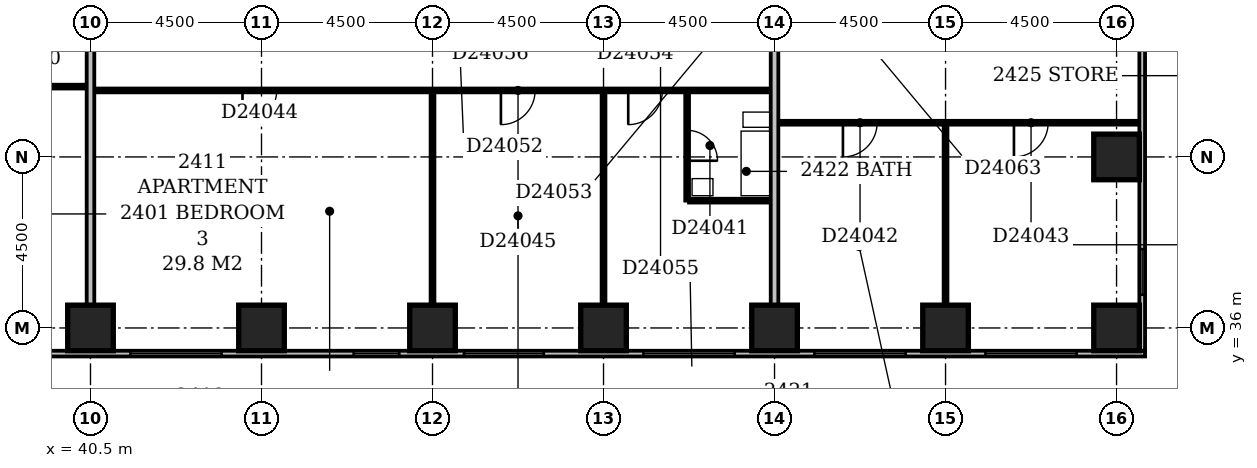
"""IFC4 building model, lengths in metres.
Left out: names, types, materials, properties, quantities, classifications, styles, units other than length and angle.
Written with IfcOpenShell. Run it as: python <this file> out.ifc"""

import sys

from ifc_helpers import new_model, si_unit, direction, frame, frame_2d, origin, origin_2d, place, context, subcontext, project, spatial, rectangle, extrude, element, fill, save


model = new_model("IFC4")
c1 = context("Model", 3, precision=1e-05, world=origin(), true_north=direction((0.0, 1.0)))
c2 = subcontext(c1, "Body", "Model", "MODEL_VIEW")
j1 = project(units=[si_unit("LENGTHUNIT", "METRE"), si_unit("PLANEANGLEUNIT", "RADIAN")], contexts=[c1])
p1 = place(None, origin())
s1 = spatial("IfcSite", under=j1, at=p1, CompositionType="ELEMENT")
p2 = place(p1, origin())
s2 = spatial("IfcBuilding", under=s1, at=p2, CompositionType="ELEMENT")
p3 = place(p2, frame((0.0, 0.0, 97.4)))
s3 = spatial("IfcBuildingStorey", under=s2, at=p3, CompositionType="ELEMENT", Elevation=97.4)
for number, where, z_axis, x_axis in (
    (1, (40.5, 36.0, -0.3), (0.0, 0.0, 1.0), (1.0, 0.0, 0.0)),
    (2, (45.0, 36.0, -0.3), (0.0, 0.0, 1.0), (1.0, 0.0, 0.0)),
    (3, (49.5, 36.0, -0.3), (0.0, 0.0, 1.0), (1.0, 0.0, 0.0)),
    (4, (54.0, 36.0, -0.3), (0.0, 0.0, 1.0), (1.0, 0.0, 0.0)),
    (5, (58.5, 36.0, -0.3), (0.0, 0.0, 1.0), (1.0, 0.0, 0.0)),
    (6, (63.0, 36.0, -0.3), (0.0, 0.0, 1.0), (1.0, 0.0, 0.0)),
    (7, (67.5, 36.0, -0.3), (0.0, 0.0, 1.0), (1.0, 0.0, 0.0)),
    (8, (67.5, 40.5, -0.3), (0.0, 0.0, 1.0), (1.0, 0.0, 0.0)),
):
    element("IfcColumn", number, at=place(p3, frame(where, z_axis=z_axis, x_axis=x_axis)), inside=s3, PredefinedType="COLUMN", context=c2, shape_type="SweptSolid", body=[
        extrude(rectangle(XDim=1.2, YDim=1.2, at=origin_2d()), origin(), (0.0, 0.0, 1.0), 3.6),
    ])
p4 = place(p3, frame((23.1, 35.325, 0.0), z_axis=(0.0, 0.0, 1.0), x_axis=(1.0, 0.0, 0.0)))
e9 = element("IfcWall", 9, at=p4, inside=s3, PredefinedType="STANDARD", context=c2, shape_type="SweptSolid", body=[
    extrude(rectangle(XDim=45.15, YDim=0.15, at=frame_2d((22.575, 0.0))), origin(), (0.0, 0.0, 1.0), 2.7),
])
p5 = place(p4, frame((0.238, 0.0, 0.6)))
e10 = element("IfcOpeningElement", 10, at=p5, cuts=e9, PredefinedType="OPENING", context=c2, shape_type="SweptSolid", body=[
    extrude(rectangle(XDim=2.1, YDim=1.8, at=frame_2d((1.05, 0.9))), frame((0.0, 0.087, 0.0), z_axis=(0.0, -1.0, 0.0), x_axis=(1.0, 0.0, 0.0)), (0.0, 0.0, 1.0), 0.174),
])
p6 = place(p4, frame((4.95, 0.0, 0.6)))
e11 = element("IfcOpeningElement", 11, at=p6, cuts=e9, PredefinedType="OPENING", context=c2, shape_type="SweptSolid", body=[
    extrude(rectangle(XDim=2.4, YDim=1.8, at=frame_2d((1.2, 0.9))), frame((0.0, 0.087, 0.0), z_axis=(0.0, -1.0, 0.0), x_axis=(1.0, 0.0, 0.0)), (0.0, 0.0, 1.0), 0.174),
])
p7 = place(p4, frame((9.45, 0.0, 0.6)))
e12 = element("IfcOpeningElement", 12, at=p7, cuts=e9, PredefinedType="OPENING", context=c2, shape_type="SweptSolid", body=[
    extrude(rectangle(XDim=2.4, YDim=1.8, at=frame_2d((1.2, 0.9))), frame((0.0, 0.087, 0.0), z_axis=(0.0, -1.0, 0.0), x_axis=(1.0, 0.0, 0.0)), (0.0, 0.0, 1.0), 0.174),
])
p8 = place(p4, frame((13.95, 0.0, 0.6)))
e13 = element("IfcOpeningElement", 13, at=p8, cuts=e9, PredefinedType="OPENING", context=c2, shape_type="SweptSolid", body=[
    extrude(rectangle(XDim=2.4, YDim=1.8, at=frame_2d((1.2, 0.9))), frame((0.0, 0.087, 0.0), z_axis=(0.0, -1.0, 0.0), x_axis=(1.0, 0.0, 0.0)), (0.0, 0.0, 1.0), 0.174),
])
p9 = place(p4, frame((18.45, 0.0, 0.6)))
e14 = element("IfcOpeningElement", 14, at=p9, cuts=e9, PredefinedType="OPENING", context=c2, shape_type="SweptSolid", body=[
    extrude(rectangle(XDim=2.4, YDim=1.8, at=frame_2d((1.2, 0.9))), frame((0.0, 0.087, 0.0), z_axis=(0.0, -1.0, 0.0), x_axis=(1.0, 0.0, 0.0)), (0.0, 0.0, 1.0), 0.174),
])
p10 = place(p4, frame((24.326, 0.0, 0.6)))
e15 = element("IfcOpeningElement", 15, at=p10, cuts=e9, PredefinedType="OPENING", context=c2, shape_type="SweptSolid", body=[
    extrude(rectangle(XDim=1.2, YDim=1.8, at=frame_2d((0.6, 0.9))), frame((0.0, 0.087, 0.0), z_axis=(0.0, -1.0, 0.0), x_axis=(1.0, 0.0, 0.0)), (0.0, 0.0, 1.0), 0.174),
])
p11 = place(p4, frame((27.227, 0.0, 0.6)))
e16 = element("IfcOpeningElement", 16, at=p11, cuts=e9, PredefinedType="OPENING", context=c2, shape_type="SweptSolid", body=[
    extrude(rectangle(XDim=2.1, YDim=1.8, at=frame_2d((1.05, 0.9))), frame((0.0, 0.087, 0.0), z_axis=(0.0, -1.0, 0.0), x_axis=(1.0, 0.0, 0.0)), (0.0, 0.0, 1.0), 0.174),
])
p12 = place(p4, frame((31.95, 0.0, 0.6)))
e17 = element("IfcOpeningElement", 17, at=p12, cuts=e9, PredefinedType="OPENING", context=c2, shape_type="SweptSolid", body=[
    extrude(rectangle(XDim=2.4, YDim=1.8, at=frame_2d((1.2, 0.9))), frame((0.0, 0.087, 0.0), z_axis=(0.0, -1.0, 0.0), x_axis=(1.0, 0.0, 0.0)), (0.0, 0.0, 1.0), 0.174),
])
p13 = place(p4, frame((36.45, 0.0, 0.6)))
e18 = element("IfcOpeningElement", 18, at=p13, cuts=e9, PredefinedType="OPENING", context=c2, shape_type="SweptSolid", body=[
    extrude(rectangle(XDim=2.4, YDim=1.8, at=frame_2d((1.2, 0.9))), frame((0.0, 0.087, 0.0), z_axis=(0.0, -1.0, 0.0), x_axis=(1.0, 0.0, 0.0)), (0.0, 0.0, 1.0), 0.174),
])
p14 = place(p4, frame((40.95, 0.0, 0.6)))
e19 = element("IfcOpeningElement", 19, at=p14, cuts=e9, PredefinedType="OPENING", context=c2, shape_type="SweptSolid", body=[
    extrude(rectangle(XDim=2.4, YDim=1.8, at=frame_2d((1.2, 0.9))), frame((0.0, 0.087, 0.0), z_axis=(0.0, -1.0, 0.0), x_axis=(1.0, 0.0, 0.0)), (0.0, 0.0, 1.0), 0.174),
])
p15 = place(p3, frame((68.175, 35.4, 0.0), z_axis=(0.0, 0.0, 1.0), x_axis=(0.0, 1.0, 0.0)))
e20 = element("IfcWall", 20, at=p15, inside=s3, PredefinedType="STANDARD", context=c2, shape_type="SweptSolid", body=[
    extrude(rectangle(XDim=23.85, YDim=0.15, at=frame_2d((11.925, 0.0))), origin(), (0.0, 0.0, 1.0), 2.7),
])
p16 = place(p15, frame((1.474, 0.0, 0.6)))
e21 = element("IfcOpeningElement", 21, at=p16, cuts=e20, PredefinedType="OPENING", context=c2, shape_type="SweptSolid", body=[
    extrude(rectangle(XDim=1.2, YDim=1.8, at=frame_2d((0.6, 0.9))), frame((0.0, 0.087, 0.0), z_axis=(0.0, -1.0, 0.0), x_axis=(1.0, 0.0, 0.0)), (0.0, 0.0, 1.0), 0.174),
])
p17 = place(p15, frame((10.65, 0.0, 0.6)))
e22 = element("IfcOpeningElement", 22, at=p17, cuts=e20, PredefinedType="OPENING", context=c2, shape_type="SweptSolid", body=[
    extrude(rectangle(XDim=2.4, YDim=1.8, at=frame_2d((1.2, 0.9))), frame((0.0, 0.087, 0.0), z_axis=(0.0, -1.0, 0.0), x_axis=(1.0, 0.0, 0.0)), (0.0, 0.0, 1.0), 0.174),
])
p18 = place(p15, frame((19.498, 0.0, 0.6)))
e23 = element("IfcOpeningElement", 23, at=p18, cuts=e20, PredefinedType="OPENING", context=c2, shape_type="SweptSolid", body=[
    extrude(rectangle(XDim=0.9, YDim=1.8, at=frame_2d((0.45, 0.9))), frame((0.0, 0.087, 0.0), z_axis=(0.0, -1.0, 0.0), x_axis=(1.0, 0.0, 0.0)), (0.0, 0.0, 1.0), 0.174),
])
p19 = place(p15, frame((21.806, 0.0, 0.6)))
e24 = element("IfcOpeningElement", 24, at=p19, cuts=e20, PredefinedType="OPENING", context=c2, shape_type="SweptSolid", body=[
    extrude(rectangle(XDim=0.45, YDim=1.8, at=frame_2d((0.225, 0.9))), frame((0.0, 0.087, 0.0), z_axis=(0.0, -1.0, 0.0), x_axis=(1.0, 0.0, 0.0)), (0.0, 0.0, 1.0), 0.174),
])
p20 = place(p3, frame((40.5, 36.6, 0.0), z_axis=(0.0, 0.0, 1.0), x_axis=(0.0, 1.0, 0.0)))
e25 = element("IfcWall", 25, at=p20, inside=s3, PredefinedType="PARTITIONING", context=c2, shape_type="SweptSolid", body=[
    extrude(rectangle(XDim=12.8, YDim=0.2, at=frame_2d((6.4, 0.0))), origin(), (0.0, 0.0, 1.0), 3.3),
])
p21 = place(p3, frame((49.5, 36.6, 0.0), z_axis=(0.0, 0.0, 1.0), x_axis=(0.0, 1.0, 0.0)))
e26 = element("IfcWall", 26, at=p21, inside=s3, PredefinedType="PARTITIONING", context=c2, shape_type="SweptSolid", body=[
    extrude(rectangle(XDim=5.6, YDim=0.1, at=frame_2d((2.8, 0.0))), origin(), (0.0, 0.0, 1.0), 3.3),
])
p22 = place(p3, frame((54.0, 36.6, 0.0), z_axis=(0.0, 0.0, 1.0), x_axis=(0.0, 1.0, 0.0)))
e27 = element("IfcWall", 27, at=p22, inside=s3, PredefinedType="PARTITIONING", context=c2, shape_type="SweptSolid", body=[
    extrude(rectangle(XDim=5.6, YDim=0.1, at=frame_2d((2.8, 0.0))), origin(), (0.0, 0.0, 1.0), 2.6),
])
p23 = place(p3, frame((58.5, 36.6, 0.0), z_axis=(0.0, 0.0, 1.0), x_axis=(0.0, 1.0, 0.0)))
e28 = element("IfcWall", 28, at=p23, inside=s3, PredefinedType="PARTITIONING", context=c2, shape_type="SweptSolid", body=[
    extrude(rectangle(XDim=12.8, YDim=0.2, at=frame_2d((6.4, 0.0))), origin(), (0.0, 0.0, 1.0), 3.3),
])
p24 = place(p3, frame((63.0, 36.6, 0.0), z_axis=(0.0, 0.0, 1.0), x_axis=(0.0, 1.0, 0.0)))
e29 = element("IfcWall", 29, at=p24, inside=s3, PredefinedType="PARTITIONING", context=c2, shape_type="SweptSolid", body=[
    extrude(rectangle(XDim=4.75, YDim=0.1, at=frame_2d((2.375, 0.0))), origin(), (0.0, 0.0, 1.0), 2.4),
])
p25 = place(p3, frame((56.2, 39.35, 0.0), z_axis=(0.0, 0.0, 1.0), x_axis=(0.0, 1.0, 0.0)))
e30 = element("IfcWall", 30, at=p25, inside=s3, PredefinedType="PLUMBINGWALL", context=c2, shape_type="SweptSolid", body=[
    extrude(rectangle(XDim=2.85, YDim=0.1, at=frame_2d((1.425, 0.0))), origin(), (0.0, 0.0, 1.0), 3.3),
])
p26 = place(p25, frame((1.05, 0.0, 0.0)))
e31 = element("IfcOpeningElement", 31, at=p26, cuts=e30, PredefinedType="OPENING", context=c2, shape_type="SweptSolid", body=[
    extrude(rectangle(XDim=0.8, YDim=2.1, at=frame_2d((0.4, 1.05))), frame((0.0, 0.062, 0.0), z_axis=(0.0, -1.0, 0.0), x_axis=(1.0, 0.0, 0.0)), (0.0, 0.0, 1.0), 0.124),
])
p27 = place(p3, frame((56.25, 39.35, 0.0), z_axis=(0.0, 0.0, 1.0), x_axis=(1.0, 0.0, 0.0)))
e32 = element("IfcWall", 32, at=p27, inside=s3, PredefinedType="PLUMBINGWALL", context=c2, shape_type="SweptSolid", body=[
    extrude(rectangle(XDim=2.15, YDim=0.1, at=frame_2d((1.075, 0.0))), origin(), (0.0, 0.0, 1.0), 3.3),
])
p28 = place(p3, frame((58.6, 41.4, 0.0), z_axis=(0.0, 0.0, 1.0), x_axis=(1.0, 0.0, 0.0)))
e33 = element("IfcWall", 33, at=p28, inside=s3, PredefinedType="PARTITIONING", context=c2, shape_type="SweptSolid", body=[
    extrude(rectangle(XDim=9.5, YDim=0.1, at=frame_2d((4.75, 0.0))), origin(), (0.0, 0.0, 1.0), 3.3),
])
p29 = place(p28, frame((1.7, 0.0, 0.0)))
e34 = element("IfcOpeningElement", 34, at=p29, cuts=e33, PredefinedType="OPENING", context=c2, shape_type="SweptSolid", body=[
    extrude(rectangle(XDim=0.9, YDim=2.1, at=frame_2d((0.45, 1.05))), frame((0.0, 0.062, 0.0), z_axis=(0.0, -1.0, 0.0), x_axis=(1.0, 0.0, 0.0)), (0.0, 0.0, 1.0), 0.124),
])
p30 = place(p28, frame((6.2, 0.0, 0.0)))
e35 = element("IfcOpeningElement", 35, at=p30, cuts=e33, PredefinedType="OPENING", context=c2, shape_type="SweptSolid", body=[
    extrude(rectangle(XDim=0.9, YDim=2.1, at=frame_2d((0.45, 1.05))), frame((0.0, 0.062, 0.0), z_axis=(0.0, -1.0, 0.0), x_axis=(1.0, 0.0, 0.0)), (0.0, 0.0, 1.0), 0.124),
])
p31 = place(p3, frame((40.6, 42.25, 0.0), z_axis=(0.0, 0.0, 1.0), x_axis=(1.0, 0.0, 0.0)))
e36 = element("IfcWall", 36, at=p31, inside=s3, PredefinedType="PARTITIONING", context=c2, shape_type="SweptSolid", body=[
    extrude(rectangle(XDim=17.8, YDim=0.1, at=frame_2d((8.9, 0.0))), origin(), (0.0, 0.0, 1.0), 3.3),
])
p32 = place(p31, frame((3.9, 0.0, 0.0)))
e37 = element("IfcOpeningElement", 37, at=p32, cuts=e36, PredefinedType="OPENING", context=c2, shape_type="SweptSolid", body=[
    extrude(rectangle(XDim=0.9, YDim=2.1, at=frame_2d((0.45, 1.05))), frame((0.0, 0.062, 0.0), z_axis=(0.0, -1.0, 0.0), x_axis=(1.0, 0.0, 0.0)), (0.0, 0.0, 1.0), 0.124),
])
p33 = place(p31, frame((10.7, 0.0, 0.0)))
e38 = element("IfcOpeningElement", 38, at=p33, cuts=e36, PredefinedType="OPENING", context=c2, shape_type="SweptSolid", body=[
    extrude(rectangle(XDim=0.9, YDim=2.1, at=frame_2d((0.45, 1.05))), frame((0.0, 0.062, 0.0), z_axis=(0.0, -1.0, 0.0), x_axis=(1.0, 0.0, 0.0)), (0.0, 0.0, 1.0), 0.124),
])
p34 = place(p31, frame((14.05, 0.0, 0.0)))
e39 = element("IfcOpeningElement", 39, at=p34, cuts=e36, PredefinedType="OPENING", context=c2, shape_type="SweptSolid", body=[
    extrude(rectangle(XDim=0.9, YDim=2.1, at=frame_2d((0.45, 1.05))), frame((0.0, 0.062, 0.0), z_axis=(0.0, -1.0, 0.0), x_axis=(1.0, 0.0, 0.0)), (0.0, 0.0, 1.0), 0.124),
])
p35 = place(p3, frame((22.6, 42.35, 0.0), z_axis=(0.0, 0.0, 1.0), x_axis=(1.0, 0.0, 0.0)))
e40 = element("IfcWall", 40, at=p35, inside=s3, PredefinedType="PARTITIONING", context=c2, shape_type="SweptSolid", body=[
    extrude(rectangle(XDim=17.8, YDim=0.1, at=frame_2d((8.9, 0.0))), origin(), (0.0, 0.0, 1.0), 3.3),
])
p36 = place(p35, frame((1.7, 0.0, 0.0)))
e41 = element("IfcOpeningElement", 41, at=p36, cuts=e40, PredefinedType="OPENING", context=c2, shape_type="SweptSolid", body=[
    extrude(rectangle(XDim=0.9, YDim=2.1, at=frame_2d((0.45, 1.05))), frame((0.0, 0.062, 0.0), z_axis=(0.0, -1.0, 0.0), x_axis=(1.0, 0.0, 0.0)), (0.0, 0.0, 1.0), 0.124),
])
p37 = place(p35, frame((6.2, 0.0, 0.0)))
e42 = element("IfcOpeningElement", 42, at=p37, cuts=e40, PredefinedType="OPENING", context=c2, shape_type="SweptSolid", body=[
    extrude(rectangle(XDim=0.9, YDim=2.1, at=frame_2d((0.45, 1.05))), frame((0.0, 0.062, 0.0), z_axis=(0.0, -1.0, 0.0), x_axis=(1.0, 0.0, 0.0)), (0.0, 0.0, 1.0), 0.124),
])
p38 = place(p35, frame((10.7, 0.0, 0.0)))
e43 = element("IfcOpeningElement", 43, at=p38, cuts=e40, PredefinedType="OPENING", context=c2, shape_type="SweptSolid", body=[
    extrude(rectangle(XDim=0.9, YDim=2.1, at=frame_2d((0.45, 1.05))), frame((0.0, 0.062, 0.0), z_axis=(0.0, -1.0, 0.0), x_axis=(1.0, 0.0, 0.0)), (0.0, 0.0, 1.0), 0.124),
])
p39 = place(p35, frame((15.2, 0.0, 0.0)))
e44 = element("IfcOpeningElement", 44, at=p39, cuts=e40, PredefinedType="OPENING", context=c2, shape_type="SweptSolid", body=[
    extrude(rectangle(XDim=0.9, YDim=2.1, at=frame_2d((0.45, 1.05))), frame((0.0, 0.062, 0.0), z_axis=(0.0, -1.0, 0.0), x_axis=(1.0, 0.0, 0.0)), (0.0, 0.0, 1.0), 0.124),
])
p40 = place(p9, origin())
e45 = element("IfcWindow", 45, at=p40, inside=s3, PartitioningType="SINGLE_PANEL", PredefinedType="WINDOW", context=c2, shape_type="SweptSolid", body=[
    extrude(rectangle(XDim=2.4, YDim=1.8, at=frame_2d((1.2, 0.9))), frame((0.0, 0.03, 0.0), z_axis=(0.0, -1.0, 0.0), x_axis=(1.0, 0.0, 0.0)), (0.0, 0.0, 1.0), 0.06),
])
fill(e14, e45)
p41 = place(p10, origin())
e46 = element("IfcWindow", 46, at=p41, inside=s3, PartitioningType="SINGLE_PANEL", PredefinedType="WINDOW", context=c2, shape_type="SweptSolid", body=[
    extrude(rectangle(XDim=1.2, YDim=1.8, at=frame_2d((0.6, 0.9))), frame((0.0, 0.03, 0.0), z_axis=(0.0, -1.0, 0.0), x_axis=(1.0, 0.0, 0.0)), (0.0, 0.0, 1.0), 0.06),
])
fill(e15, e46)
p42 = place(p11, origin())
e47 = element("IfcWindow", 47, at=p42, inside=s3, PartitioningType="SINGLE_PANEL", PredefinedType="WINDOW", context=c2, shape_type="SweptSolid", body=[
    extrude(rectangle(XDim=2.1, YDim=1.8, at=frame_2d((1.05, 0.9))), frame((0.0, 0.03, 0.0), z_axis=(0.0, -1.0, 0.0), x_axis=(1.0, 0.0, 0.0)), (0.0, 0.0, 1.0), 0.06),
])
fill(e16, e47)
p43 = place(p12, origin())
e48 = element("IfcWindow", 48, at=p43, inside=s3, PartitioningType="SINGLE_PANEL", PredefinedType="WINDOW", context=c2, shape_type="SweptSolid", body=[
    extrude(rectangle(XDim=2.4, YDim=1.8, at=frame_2d((1.2, 0.9))), frame((0.0, 0.03, 0.0), z_axis=(0.0, -1.0, 0.0), x_axis=(1.0, 0.0, 0.0)), (0.0, 0.0, 1.0), 0.06),
])
fill(e17, e48)
p44 = place(p13, origin())
e49 = element("IfcWindow", 49, at=p44, inside=s3, PartitioningType="SINGLE_PANEL", PredefinedType="WINDOW", context=c2, shape_type="SweptSolid", body=[
    extrude(rectangle(XDim=2.4, YDim=1.8, at=frame_2d((1.2, 0.9))), frame((0.0, 0.03, 0.0), z_axis=(0.0, -1.0, 0.0), x_axis=(1.0, 0.0, 0.0)), (0.0, 0.0, 1.0), 0.06),
])
fill(e18, e49)
p45 = place(p14, origin())
e50 = element("IfcWindow", 50, at=p45, inside=s3, PartitioningType="SINGLE_PANEL", PredefinedType="WINDOW", context=c2, shape_type="SweptSolid", body=[
    extrude(rectangle(XDim=2.4, YDim=1.8, at=frame_2d((1.2, 0.9))), frame((0.0, 0.03, 0.0), z_axis=(0.0, -1.0, 0.0), x_axis=(1.0, 0.0, 0.0)), (0.0, 0.0, 1.0), 0.06),
])
fill(e19, e50)
p46 = place(p16, origin())
e51 = element("IfcWindow", 51, at=p46, inside=s3, PartitioningType="SINGLE_PANEL", PredefinedType="WINDOW", context=c2, shape_type="SweptSolid", body=[
    extrude(rectangle(XDim=1.2, YDim=1.8, at=frame_2d((0.6, 0.9))), frame((0.0, 0.03, 0.0), z_axis=(0.0, -1.0, 0.0), x_axis=(1.0, 0.0, 0.0)), (0.0, 0.0, 1.0), 0.06),
])
fill(e21, e51)
p47 = place(p26, frame((0.8, 0.0, 0.0), z_axis=(0.0, 0.0, 1.0), x_axis=(-1.0, 0.0, 0.0)))
e52 = element("IfcDoor", 52, at=p47, inside=s3, OperationType="SINGLE_SWING_RIGHT", PredefinedType="DOOR", context=c2, shape_type="SweptSolid", body=[
    extrude(rectangle(XDim=0.8, YDim=2.1, at=frame_2d((0.4, 1.05))), frame((0.0, 0.025, 0.0), z_axis=(0.0, -1.0, 0.0), x_axis=(1.0, 0.0, 0.0)), (0.0, 0.0, 1.0), 0.05),
])
fill(e31, e52)
p48 = place(p29, frame((0.9, 0.0, 0.0), z_axis=(0.0, 0.0, 1.0), x_axis=(-1.0, 0.0, 0.0)))
e53 = element("IfcDoor", 53, at=p48, inside=s3, OperationType="SINGLE_SWING_RIGHT", PredefinedType="DOOR", context=c2, shape_type="SweptSolid", body=[
    extrude(rectangle(XDim=0.9, YDim=2.1, at=frame_2d((0.45, 1.05))), frame((0.0, 0.025, 0.0), z_axis=(0.0, -1.0, 0.0), x_axis=(1.0, 0.0, 0.0)), (0.0, 0.0, 1.0), 0.05),
])
fill(e34, e53)
p49 = place(p30, frame((0.9, 0.0, 0.0), z_axis=(0.0, 0.0, 1.0), x_axis=(-1.0, 0.0, 0.0)))
e54 = element("IfcDoor", 54, at=p49, inside=s3, OperationType="SINGLE_SWING_RIGHT", PredefinedType="DOOR", context=c2, shape_type="SweptSolid", body=[
    extrude(rectangle(XDim=0.9, YDim=2.1, at=frame_2d((0.45, 1.05))), frame((0.0, 0.025, 0.0), z_axis=(0.0, -1.0, 0.0), x_axis=(1.0, 0.0, 0.0)), (0.0, 0.0, 1.0), 0.05),
])
fill(e35, e54)
p50 = place(p32, frame((0.9, 0.0, 0.0), z_axis=(0.0, 0.0, 1.0), x_axis=(-1.0, 0.0, 0.0)))
e55 = element("IfcDoor", 55, at=p50, inside=s3, OperationType="SINGLE_SWING_RIGHT", PredefinedType="DOOR", context=c2, shape_type="SweptSolid", body=[
    extrude(rectangle(XDim=0.9, YDim=2.1, at=frame_2d((0.45, 1.05))), frame((0.0, 0.025, 0.0), z_axis=(0.0, -1.0, 0.0), x_axis=(1.0, 0.0, 0.0)), (0.0, 0.0, 1.0), 0.05),
])
fill(e37, e55)
p51 = place(p33, frame((0.9, 0.0, 0.0), z_axis=(0.0, 0.0, 1.0), x_axis=(-1.0, 0.0, 0.0)))
e56 = element("IfcDoor", 56, at=p51, inside=s3, OperationType="SINGLE_SWING_RIGHT", PredefinedType="DOOR", context=c2, shape_type="SweptSolid", body=[
    extrude(rectangle(XDim=0.9, YDim=2.1, at=frame_2d((0.45, 1.05))), frame((0.0, 0.025, 0.0), z_axis=(0.0, -1.0, 0.0), x_axis=(1.0, 0.0, 0.0)), (0.0, 0.0, 1.0), 0.05),
])
fill(e38, e56)
p52 = place(p34, frame((0.9, 0.0, 0.0), z_axis=(0.0, 0.0, 1.0), x_axis=(-1.0, 0.0, 0.0)))
e57 = element("IfcDoor", 57, at=p52, inside=s3, OperationType="SINGLE_SWING_RIGHT", PredefinedType="DOOR", context=c2, shape_type="SweptSolid", body=[
    extrude(rectangle(XDim=0.9, YDim=2.1, at=frame_2d((0.45, 1.05))), frame((0.0, 0.025, 0.0), z_axis=(0.0, -1.0, 0.0), x_axis=(1.0, 0.0, 0.0)), (0.0, 0.0, 1.0), 0.05),
])
fill(e39, e57)
save(model, sys.argv[1])
